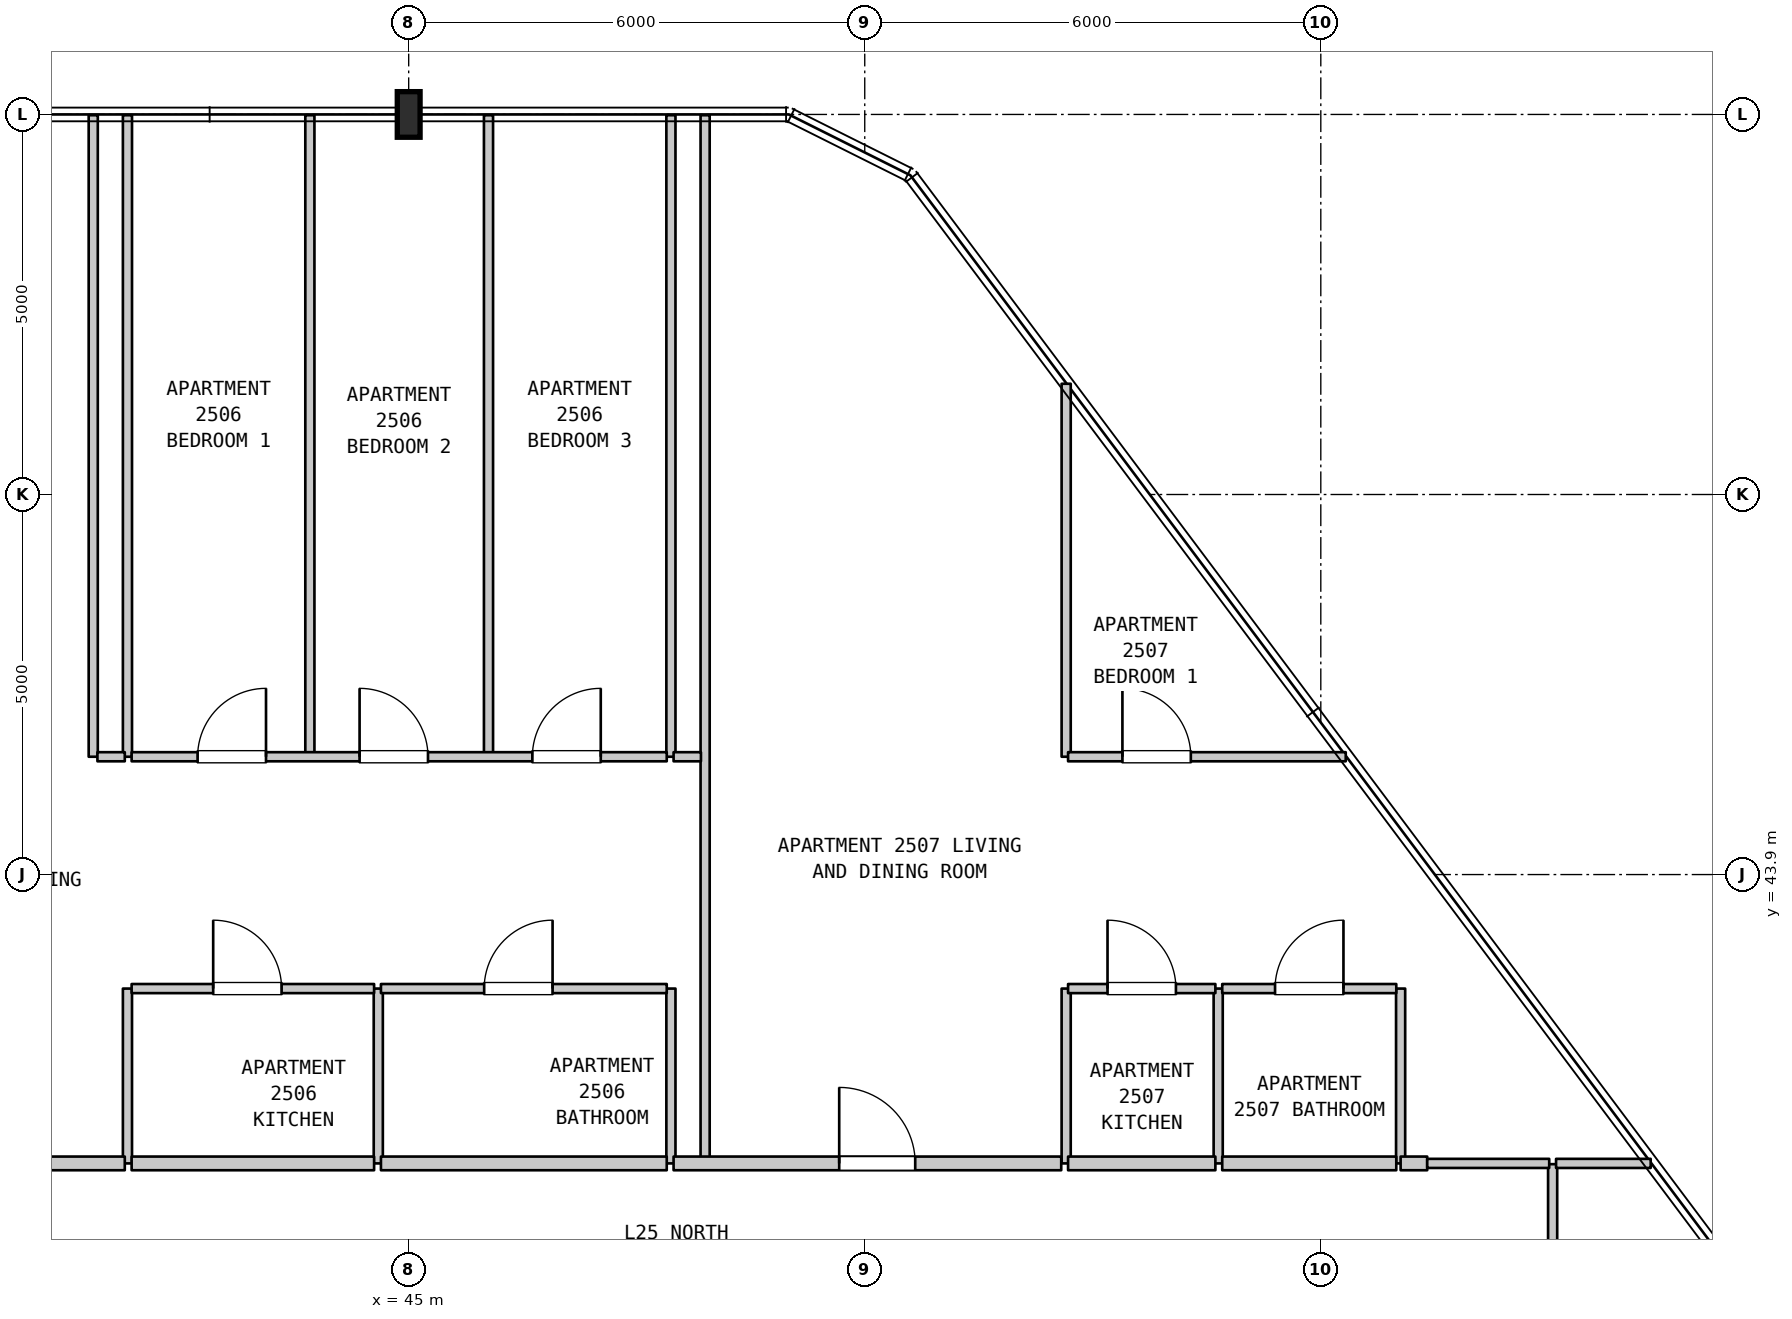
"""IFC4 building model, lengths in metres.
Left out: names, types, materials, properties, quantities, classifications, styles, units other than length and angle.
Written with IfcOpenShell. Run it as: python <this file> out.ifc"""

import sys

from ifc_helpers import new_model, si_unit, direction, frame, frame_2d, origin, origin_2d, place, context, subcontext, project, spatial, rectangle, i_section, extrude, element, fill, save


model = new_model("IFC4")
c1 = context("Model", 3, precision=1e-05, world=origin(), true_north=direction((0.0, 1.0)))
c2 = subcontext(c1, "Body", "Model", "MODEL_VIEW")
j1 = project(units=[si_unit("LENGTHUNIT", "METRE"), si_unit("PLANEANGLEUNIT", "RADIAN")], contexts=[c1])
p1 = place(None, origin())
s1 = spatial("IfcSite", under=j1, at=p1, CompositionType="ELEMENT")
p2 = place(p1, origin())
s2 = spatial("IfcBuilding", under=s1, at=p2, CompositionType="ELEMENT")
p3 = place(p2, frame((0.0, 0.0, 105.7)))
s3 = spatial("IfcBuildingStorey", under=s2, at=p3, CompositionType="ELEMENT", Elevation=105.7)
p4 = place(p3, frame((45.0, 53.9, 0.0), z_axis=(0.0, 0.0, 1.0), x_axis=(1.0, 0.0, 0.0)))
e1 = element("IfcColumn", 1, at=p4, inside=s3, PredefinedType="COLUMN", context=c2, shape_type="SweptSolid", body=[
    extrude(i_section(OverallWidth=0.3, OverallDepth=0.6, WebThickness=0.015, FlangeThickness=0.03, FilletRadius=0.027, at=origin_2d()), origin(), (0.0, 0.0, 1.0), 3.7),
])
p5 = place(p3, frame((40.85, 45.45, 0.0), z_axis=(0.0, 0.0, 1.0), x_axis=(0.0, 1.0, 0.0)))
e2 = element("IfcWall", 2, at=p5, inside=s3, PredefinedType="PARTITIONING", context=c2, shape_type="SweptSolid", body=[
    extrude(rectangle(XDim=8.44, YDim=0.12, at=frame_2d((4.22, 0.0))), origin(), (0.0, 0.0, 1.0), 3.385),
])
p6 = place(p3, frame((41.3, 40.1, 0.0), z_axis=(0.0, 0.0, 1.0), x_axis=(0.0, 1.0, 0.0)))
e3 = element("IfcWall", 3, at=p6, inside=s3, PredefinedType="PARTITIONING", context=c2, shape_type="SweptSolid", body=[
    extrude(rectangle(XDim=2.3, YDim=0.12, at=frame_2d((1.15, 0.0))), origin(), (0.0, 0.0, 1.0), 3.385),
])
for number, where, z_axis, x_axis in (
    (4, (41.3, 45.45, 0.0), (0.0, 0.0, 1.0), (0.0, 1.0, 0.0)),
    (5, (43.7, 45.45, 0.0), (0.0, 0.0, 1.0), (0.0, 1.0, 0.0)),
):
    element("IfcWall", number, at=place(p3, frame(where, z_axis=z_axis, x_axis=x_axis)), inside=s3, PredefinedType="PARTITIONING", context=c2, shape_type="SweptSolid", body=[
        extrude(rectangle(XDim=8.44, YDim=0.12, at=frame_2d((4.22, 0.0))), origin(), (0.0, 0.0, 1.0), 3.385),
    ])
p7 = place(p3, frame((44.6, 40.1, 0.0), z_axis=(0.0, 0.0, 1.0), x_axis=(0.0, 1.0, 0.0)))
e6 = element("IfcWall", 6, at=p7, inside=s3, PredefinedType="PARTITIONING", context=c2, shape_type="SweptSolid", body=[
    extrude(rectangle(XDim=2.3, YDim=0.12, at=frame_2d((1.15, 0.0))), origin(), (0.0, 0.0, 1.0), 3.385),
])
p8 = place(p3, frame((46.05, 45.45, 0.0), z_axis=(0.0, 0.0, 1.0), x_axis=(0.0, 1.0, 0.0)))
e7 = element("IfcWall", 7, at=p8, inside=s3, PredefinedType="PARTITIONING", context=c2, shape_type="SweptSolid", body=[
    extrude(rectangle(XDim=8.44, YDim=0.12, at=frame_2d((4.22, 0.0))), origin(), (0.0, 0.0, 1.0), 3.385),
])
p9 = place(p3, frame((48.45, 40.1, 0.0), z_axis=(0.0, 0.0, 1.0), x_axis=(0.0, 1.0, 0.0)))
e8 = element("IfcWall", 8, at=p9, inside=s3, PredefinedType="PARTITIONING", context=c2, shape_type="SweptSolid", body=[
    extrude(rectangle(XDim=2.3, YDim=0.12, at=frame_2d((1.15, 0.0))), origin(), (0.0, 0.0, 1.0), 3.385),
])
p10 = place(p3, frame((48.45, 45.45, 0.0), z_axis=(0.0, 0.0, 1.0), x_axis=(0.0, 1.0, 0.0)))
e9 = element("IfcWall", 9, at=p10, inside=s3, PredefinedType="PARTITIONING", context=c2, shape_type="SweptSolid", body=[
    extrude(rectangle(XDim=8.44, YDim=0.12, at=frame_2d((4.22, 0.0))), origin(), (0.0, 0.0, 1.0), 3.385),
])
p11 = place(p3, frame((48.9, 40.1, 0.0), z_axis=(0.0, 0.0, 1.0), x_axis=(0.0, 1.0, 0.0)))
e10 = element("IfcWall", 10, at=p11, inside=s3, PredefinedType="PARTITIONING", context=c2, shape_type="SweptSolid", body=[
    extrude(rectangle(XDim=13.79, YDim=0.12, at=frame_2d((6.895, 0.0))), origin(), (0.0, 0.0, 1.0), 3.385),
])
p12 = place(p3, frame((53.65, 40.1, 0.0), z_axis=(0.0, 0.0, 1.0), x_axis=(0.0, 1.0, 0.0)))
e11 = element("IfcWall", 11, at=p12, inside=s3, PredefinedType="PARTITIONING", context=c2, shape_type="SweptSolid", body=[
    extrude(rectangle(XDim=2.3, YDim=0.12, at=frame_2d((1.15, 0.0))), origin(), (0.0, 0.0, 1.0), 3.385),
])
p13 = place(p3, frame((53.65, 45.45, 0.0), z_axis=(0.0, 0.0, 1.0), x_axis=(0.0, 1.0, 0.0)))
e12 = element("IfcWall", 12, at=p13, inside=s3, PredefinedType="PARTITIONING", context=c2, shape_type="SweptSolid", body=[
    extrude(rectangle(XDim=4.907, YDim=0.12, at=frame_2d((2.454, 0.0))), origin(), (0.0, 0.0, 1.0), 3.385),
])
for number, where, z_axis, x_axis in (
    (13, (55.65, 40.1, 0.0), (0.0, 0.0, 1.0), (0.0, 1.0, 0.0)),
    (14, (58.05, 40.1, 0.0), (0.0, 0.0, 1.0), (0.0, 1.0, 0.0)),
):
    element("IfcWall", number, at=place(p3, frame(where, z_axis=z_axis, x_axis=x_axis)), inside=s3, PredefinedType="PARTITIONING", context=c2, shape_type="SweptSolid", body=[
        extrude(rectangle(XDim=2.3, YDim=0.12, at=frame_2d((1.15, 0.0))), origin(), (0.0, 0.0, 1.0), 3.385),
    ])
p14 = place(p3, frame((60.05, 37.89, 0.0), z_axis=(0.0, 0.0, 1.0), x_axis=(0.0, 1.0, 0.0)))
e15 = element("IfcWall", 15, at=p14, inside=s3, PredefinedType="PARTITIONING", context=c2, shape_type="SweptSolid", body=[
    extrude(rectangle(XDim=2.2, YDim=0.12, at=frame_2d((1.1, 0.0))), origin(), (0.0, 0.0, 1.0), 3.385),
])
p15 = place(p3, frame((36.125, 40.1, 0.0), z_axis=(0.0, 0.0, 1.0), x_axis=(1.0, 0.0, 0.0)))
e16 = element("IfcWall", 16, at=p15, inside=s3, PredefinedType="STANDARD", context=c2, shape_type="SweptSolid", body=[
    extrude(rectangle(XDim=5.14, YDim=0.18, at=frame_2d((2.57, 0.0))), origin(), (0.0, 0.0, 1.0), 3.385),
])
p16 = place(p15, frame((2.198, 0.0, 0.0)))
e17 = element("IfcOpeningElement", 17, at=p16, cuts=e16, PredefinedType="OPENING", context=c2, shape_type="SweptSolid", body=[
    extrude(rectangle(XDim=1.0, YDim=2.15, at=frame_2d((0.5, 1.075))), frame((0.0, 0.1, 0.0), z_axis=(0.0, -1.0, 0.0), x_axis=(1.0, 0.0, 0.0)), (0.0, 0.0, 1.0), 0.2),
])
p17 = place(p3, frame((41.355, 40.1, 0.0), z_axis=(0.0, 0.0, 1.0), x_axis=(1.0, 0.0, 0.0)))
e18 = element("IfcWall", 18, at=p17, inside=s3, PredefinedType="STANDARD", context=c2, shape_type="SweptSolid", body=[
    extrude(rectangle(XDim=3.19, YDim=0.18, at=frame_2d((1.595, 0.0))), origin(), (0.0, 0.0, 1.0), 3.385),
])
p18 = place(p3, frame((44.635, 40.1, 0.0), z_axis=(0.0, 0.0, 1.0), x_axis=(1.0, 0.0, 0.0)))
e19 = element("IfcWall", 19, at=p18, inside=s3, PredefinedType="STANDARD", context=c2, shape_type="SweptSolid", body=[
    extrude(rectangle(XDim=3.76, YDim=0.18, at=frame_2d((1.88, 0.0))), origin(), (0.0, 0.0, 1.0), 3.385),
])
p19 = place(p3, frame((48.485, 40.1, 0.0), z_axis=(0.0, 0.0, 1.0), x_axis=(1.0, 0.0, 0.0)))
e20 = element("IfcWall", 20, at=p19, inside=s3, PredefinedType="STANDARD", context=c2, shape_type="SweptSolid", body=[
    extrude(rectangle(XDim=5.1, YDim=0.18, at=frame_2d((2.55, 0.0))), origin(), (0.0, 0.0, 1.0), 3.385),
])
p20 = place(p19, frame((2.179, 0.0, 0.0)))
e21 = element("IfcOpeningElement", 21, at=p20, cuts=e20, PredefinedType="OPENING", context=c2, shape_type="SweptSolid", body=[
    extrude(rectangle(XDim=1.0, YDim=2.15, at=frame_2d((0.5, 1.075))), frame((0.0, 0.1, 0.0), z_axis=(0.0, -1.0, 0.0), x_axis=(1.0, 0.0, 0.0)), (0.0, 0.0, 1.0), 0.2),
])
p21 = place(p3, frame((53.675, 40.1, 0.0), z_axis=(0.0, 0.0, 1.0), x_axis=(1.0, 0.0, 0.0)))
e22 = element("IfcWall", 22, at=p21, inside=s3, PredefinedType="STANDARD", context=c2, shape_type="SweptSolid", body=[
    extrude(rectangle(XDim=1.938, YDim=0.18, at=frame_2d((0.969, 0.0))), origin(), (0.0, 0.0, 1.0), 3.385),
])
p22 = place(p3, frame((55.703, 40.1, 0.0), z_axis=(0.0, 0.0, 1.0), x_axis=(1.0, 0.0, 0.0)))
e23 = element("IfcWall", 23, at=p22, inside=s3, PredefinedType="STANDARD", context=c2, shape_type="SweptSolid", body=[
    extrude(rectangle(XDim=2.29, YDim=0.18, at=frame_2d((1.145, 0.0))), origin(), (0.0, 0.0, 1.0), 3.385),
])
p23 = place(p3, frame((58.05, 40.1, 0.0), z_axis=(0.0, 0.0, 1.0), x_axis=(1.0, 0.0, 0.0)))
e24 = element("IfcWall", 24, at=p23, inside=s3, PredefinedType="STANDARD", context=c2, shape_type="SweptSolid", body=[
    extrude(rectangle(XDim=0.35, YDim=0.18, at=frame_2d((0.175, 0.0))), origin(), (0.0, 0.0, 1.0), 3.385),
])
p24 = place(p3, frame((58.4, 40.1, 0.0), z_axis=(0.0, 0.0, 1.0), x_axis=(1.0, 0.0, 0.0)))
e25 = element("IfcWall", 25, at=p24, inside=s3, PredefinedType="PARTITIONING", context=c2, shape_type="SweptSolid", body=[
    extrude(rectangle(XDim=1.605, YDim=0.12, at=frame_2d((0.802, 0.0))), origin(), (0.0, 0.0, 1.0), 3.385),
])
p25 = place(p3, frame((60.095, 40.1, 0.0), z_axis=(0.0, 0.0, 1.0), x_axis=(1.0, 0.0, 0.0)))
e26 = element("IfcWall", 26, at=p25, inside=s3, PredefinedType="PARTITIONING", context=c2, shape_type="SweptSolid", body=[
    extrude(rectangle(XDim=1.245, YDim=0.12, at=frame_2d((0.623, 0.0))), origin(), (0.0, 0.0, 1.0), 3.385),
])
p26 = place(p3, frame((41.355, 42.4, 0.0), z_axis=(0.0, 0.0, 1.0), x_axis=(1.0, 0.0, 0.0)))
e27 = element("IfcWall", 27, at=p26, inside=s3, PredefinedType="PARTITIONING", context=c2, shape_type="SweptSolid", body=[
    extrude(rectangle(XDim=3.19, YDim=0.12, at=frame_2d((1.595, 0.0))), origin(), (0.0, 0.0, 1.0), 3.385),
])
p27 = place(p26, frame((1.073, 0.0, 0.0)))
e28 = element("IfcOpeningElement", 28, at=p27, cuts=e27, PredefinedType="OPENING", context=c2, shape_type="SweptSolid", body=[
    extrude(rectangle(XDim=0.9, YDim=2.15, at=frame_2d((0.45, 1.075))), frame((0.0, 0.07, 0.0), z_axis=(0.0, -1.0, 0.0), x_axis=(1.0, 0.0, 0.0)), (0.0, 0.0, 1.0), 0.14),
])
p28 = place(p3, frame((44.635, 42.4, 0.0), z_axis=(0.0, 0.0, 1.0), x_axis=(1.0, 0.0, 0.0)))
e29 = element("IfcWall", 29, at=p28, inside=s3, PredefinedType="PARTITIONING", context=c2, shape_type="SweptSolid", body=[
    extrude(rectangle(XDim=3.76, YDim=0.12, at=frame_2d((1.88, 0.0))), origin(), (0.0, 0.0, 1.0), 3.385),
])
p29 = place(p28, frame((1.358, 0.0, 0.0)))
e30 = element("IfcOpeningElement", 30, at=p29, cuts=e29, PredefinedType="OPENING", context=c2, shape_type="SweptSolid", body=[
    extrude(rectangle(XDim=0.9, YDim=2.1, at=frame_2d((0.45, 1.05))), frame((0.0, 0.07, 0.0), z_axis=(0.0, -1.0, 0.0), x_axis=(1.0, 0.0, 0.0)), (0.0, 0.0, 1.0), 0.14),
])
p30 = place(p3, frame((53.675, 42.4, 0.0), z_axis=(0.0, 0.0, 1.0), x_axis=(1.0, 0.0, 0.0)))
e31 = element("IfcWall", 31, at=p30, inside=s3, PredefinedType="PARTITIONING", context=c2, shape_type="SweptSolid", body=[
    extrude(rectangle(XDim=1.938, YDim=0.12, at=frame_2d((0.969, 0.0))), origin(), (0.0, 0.0, 1.0), 3.385),
])
p31 = place(p30, frame((0.519, 0.0, 0.0)))
e32 = element("IfcOpeningElement", 32, at=p31, cuts=e31, PredefinedType="OPENING", context=c2, shape_type="SweptSolid", body=[
    extrude(rectangle(XDim=0.9, YDim=2.15, at=frame_2d((0.45, 1.075))), frame((0.0, 0.07, 0.0), z_axis=(0.0, -1.0, 0.0), x_axis=(1.0, 0.0, 0.0)), (0.0, 0.0, 1.0), 0.14),
])
p32 = place(p3, frame((55.703, 42.4, 0.0), z_axis=(0.0, 0.0, 1.0), x_axis=(1.0, 0.0, 0.0)))
e33 = element("IfcWall", 33, at=p32, inside=s3, PredefinedType="PARTITIONING", context=c2, shape_type="SweptSolid", body=[
    extrude(rectangle(XDim=2.29, YDim=0.12, at=frame_2d((1.145, 0.0))), origin(), (0.0, 0.0, 1.0), 3.385),
])
p33 = place(p32, frame((0.695, 0.0, 0.0)))
e34 = element("IfcOpeningElement", 34, at=p33, cuts=e33, PredefinedType="OPENING", context=c2, shape_type="SweptSolid", body=[
    extrude(rectangle(XDim=0.9, YDim=2.1, at=frame_2d((0.45, 1.05))), frame((0.0, 0.07, 0.0), z_axis=(0.0, -1.0, 0.0), x_axis=(1.0, 0.0, 0.0)), (0.0, 0.0, 1.0), 0.14),
])
p34 = place(p3, frame((40.905, 45.45, 0.0), z_axis=(0.0, 0.0, 1.0), x_axis=(1.0, 0.0, 0.0)))
e35 = element("IfcWall", 35, at=p34, inside=s3, PredefinedType="PARTITIONING", context=c2, shape_type="SweptSolid", body=[
    extrude(rectangle(XDim=0.36, YDim=0.12, at=frame_2d((0.18, 0.0))), origin(), (0.0, 0.0, 1.0), 3.385),
])
p35 = place(p3, frame((41.355, 45.45, 0.0), z_axis=(0.0, 0.0, 1.0), x_axis=(1.0, 0.0, 0.0)))
e36 = element("IfcWall", 36, at=p35, inside=s3, PredefinedType="PARTITIONING", context=c2, shape_type="SweptSolid", body=[
    extrude(rectangle(XDim=7.04, YDim=0.12, at=frame_2d((3.52, 0.0))), origin(), (0.0, 0.0, 1.0), 3.385),
])
p36 = place(p35, frame((0.868, 0.0, 0.0)))
e37 = element("IfcOpeningElement", 37, at=p36, cuts=e36, PredefinedType="OPENING", context=c2, shape_type="SweptSolid", body=[
    extrude(rectangle(XDim=0.9, YDim=2.15, at=frame_2d((0.45, 1.075))), frame((0.0, 0.07, 0.0), z_axis=(0.0, -1.0, 0.0), x_axis=(1.0, 0.0, 0.0)), (0.0, 0.0, 1.0), 0.14),
])
p37 = place(p35, frame((2.999, 0.0, 0.0)))
e38 = element("IfcOpeningElement", 38, at=p37, cuts=e36, PredefinedType="OPENING", context=c2, shape_type="SweptSolid", body=[
    extrude(rectangle(XDim=0.9, YDim=2.15, at=frame_2d((0.45, 1.075))), frame((0.0, 0.07, 0.0), z_axis=(0.0, -1.0, 0.0), x_axis=(1.0, 0.0, 0.0)), (0.0, 0.0, 1.0), 0.14),
])
p38 = place(p35, frame((5.272, 0.0, 0.0)))
e39 = element("IfcOpeningElement", 39, at=p38, cuts=e36, PredefinedType="OPENING", context=c2, shape_type="SweptSolid", body=[
    extrude(rectangle(XDim=0.9, YDim=2.15, at=frame_2d((0.45, 1.075))), frame((0.0, 0.07, 0.0), z_axis=(0.0, -1.0, 0.0), x_axis=(1.0, 0.0, 0.0)), (0.0, 0.0, 1.0), 0.14),
])
p39 = place(p3, frame((48.485, 45.45, 0.0), z_axis=(0.0, 0.0, 1.0), x_axis=(1.0, 0.0, 0.0)))
e40 = element("IfcWall", 40, at=p39, inside=s3, PredefinedType="PARTITIONING", context=c2, shape_type="SweptSolid", body=[
    extrude(rectangle(XDim=0.36, YDim=0.12, at=frame_2d((0.18, 0.0))), origin(), (0.0, 0.0, 1.0), 3.385),
])
p40 = place(p3, frame((53.675, 45.45, 0.0), z_axis=(0.0, 0.0, 1.0), x_axis=(1.0, 0.0, 0.0)))
e41 = element("IfcWall", 41, at=p40, inside=s3, PredefinedType="PARTITIONING", context=c2, shape_type="SweptSolid", body=[
    extrude(rectangle(XDim=3.653, YDim=0.12, at=frame_2d((1.826, 0.0))), origin(), (0.0, 0.0, 1.0), 3.385),
])
p41 = place(p40, frame((0.715, 0.0, 0.0)))
e42 = element("IfcOpeningElement", 42, at=p41, cuts=e41, PredefinedType="OPENING", context=c2, shape_type="SweptSolid", body=[
    extrude(rectangle(XDim=0.9, YDim=2.15, at=frame_2d((0.45, 1.075))), frame((0.0, 0.07, 0.0), z_axis=(0.0, -1.0, 0.0), x_axis=(1.0, 0.0, 0.0)), (0.0, 0.0, 1.0), 0.14),
])
p42 = place(p20, origin())
e43 = element("IfcDoor", 43, at=p42, inside=s3, OperationType="SINGLE_SWING_LEFT", PredefinedType="DOOR", context=c2, shape_type="SweptSolid", body=[
    extrude(rectangle(XDim=1.0, YDim=2.15, at=frame_2d((0.5, 1.075))), frame((0.0, 0.025, 0.0), z_axis=(0.0, -1.0, 0.0), x_axis=(1.0, 0.0, 0.0)), (0.0, 0.0, 1.0), 0.05),
])
fill(e21, e43)
p43 = place(p27, origin())
e44 = element("IfcDoor", 44, at=p43, inside=s3, OperationType="SINGLE_SWING_LEFT", PredefinedType="DOOR", context=c2, shape_type="SweptSolid", body=[
    extrude(rectangle(XDim=0.9, YDim=2.15, at=frame_2d((0.45, 1.075))), frame((0.0, 0.025, 0.0), z_axis=(0.0, -1.0, 0.0), x_axis=(1.0, 0.0, 0.0)), (0.0, 0.0, 1.0), 0.05),
])
fill(e28, e44)
p44 = place(p29, origin())
e45 = element("IfcDoor", 45, at=p44, inside=s3, OperationType="SINGLE_SWING_RIGHT", PredefinedType="DOOR", context=c2, shape_type="SweptSolid", body=[
    extrude(rectangle(XDim=0.9, YDim=2.1, at=frame_2d((0.45, 1.05))), frame((0.0, 0.025, 0.0), z_axis=(0.0, -1.0, 0.0), x_axis=(1.0, 0.0, 0.0)), (0.0, 0.0, 1.0), 0.05),
])
fill(e30, e45)
p45 = place(p31, origin())
e46 = element("IfcDoor", 46, at=p45, inside=s3, OperationType="SINGLE_SWING_LEFT", PredefinedType="DOOR", context=c2, shape_type="SweptSolid", body=[
    extrude(rectangle(XDim=0.9, YDim=2.15, at=frame_2d((0.45, 1.075))), frame((0.0, 0.025, 0.0), z_axis=(0.0, -1.0, 0.0), x_axis=(1.0, 0.0, 0.0)), (0.0, 0.0, 1.0), 0.05),
])
fill(e32, e46)
p46 = place(p33, origin())
e47 = element("IfcDoor", 47, at=p46, inside=s3, OperationType="SINGLE_SWING_RIGHT", PredefinedType="DOOR", context=c2, shape_type="SweptSolid", body=[
    extrude(rectangle(XDim=0.9, YDim=2.1, at=frame_2d((0.45, 1.05))), frame((0.0, 0.025, 0.0), z_axis=(0.0, -1.0, 0.0), x_axis=(1.0, 0.0, 0.0)), (0.0, 0.0, 1.0), 0.05),
])
fill(e34, e47)
p47 = place(p36, origin())
e48 = element("IfcDoor", 48, at=p47, inside=s3, OperationType="SINGLE_SWING_RIGHT", PredefinedType="DOOR", context=c2, shape_type="SweptSolid", body=[
    extrude(rectangle(XDim=0.9, YDim=2.15, at=frame_2d((0.45, 1.075))), frame((0.0, 0.025, 0.0), z_axis=(0.0, -1.0, 0.0), x_axis=(1.0, 0.0, 0.0)), (0.0, 0.0, 1.0), 0.05),
])
fill(e37, e48)
p48 = place(p37, origin())
e49 = element("IfcDoor", 49, at=p48, inside=s3, OperationType="SINGLE_SWING_LEFT", PredefinedType="DOOR", context=c2, shape_type="SweptSolid", body=[
    extrude(rectangle(XDim=0.9, YDim=2.15, at=frame_2d((0.45, 1.075))), frame((0.0, 0.025, 0.0), z_axis=(0.0, -1.0, 0.0), x_axis=(1.0, 0.0, 0.0)), (0.0, 0.0, 1.0), 0.05),
])
fill(e38, e49)
p49 = place(p38, origin())
e50 = element("IfcDoor", 50, at=p49, inside=s3, OperationType="SINGLE_SWING_RIGHT", PredefinedType="DOOR", context=c2, shape_type="SweptSolid", body=[
    extrude(rectangle(XDim=0.9, YDim=2.15, at=frame_2d((0.45, 1.075))), frame((0.0, 0.025, 0.0), z_axis=(0.0, -1.0, 0.0), x_axis=(1.0, 0.0, 0.0)), (0.0, 0.0, 1.0), 0.05),
])
fill(e39, e50)
p50 = place(p41, origin())
e51 = element("IfcDoor", 51, at=p50, inside=s3, OperationType="SINGLE_SWING_LEFT", PredefinedType="DOOR", context=c2, shape_type="SweptSolid", body=[
    extrude(rectangle(XDim=0.9, YDim=2.15, at=frame_2d((0.45, 1.075))), frame((0.0, 0.025, 0.0), z_axis=(0.0, -1.0, 0.0), x_axis=(1.0, 0.0, 0.0)), (0.0, 0.0, 1.0), 0.05),
])
fill(e42, e51)
save(model, sys.argv[1])
